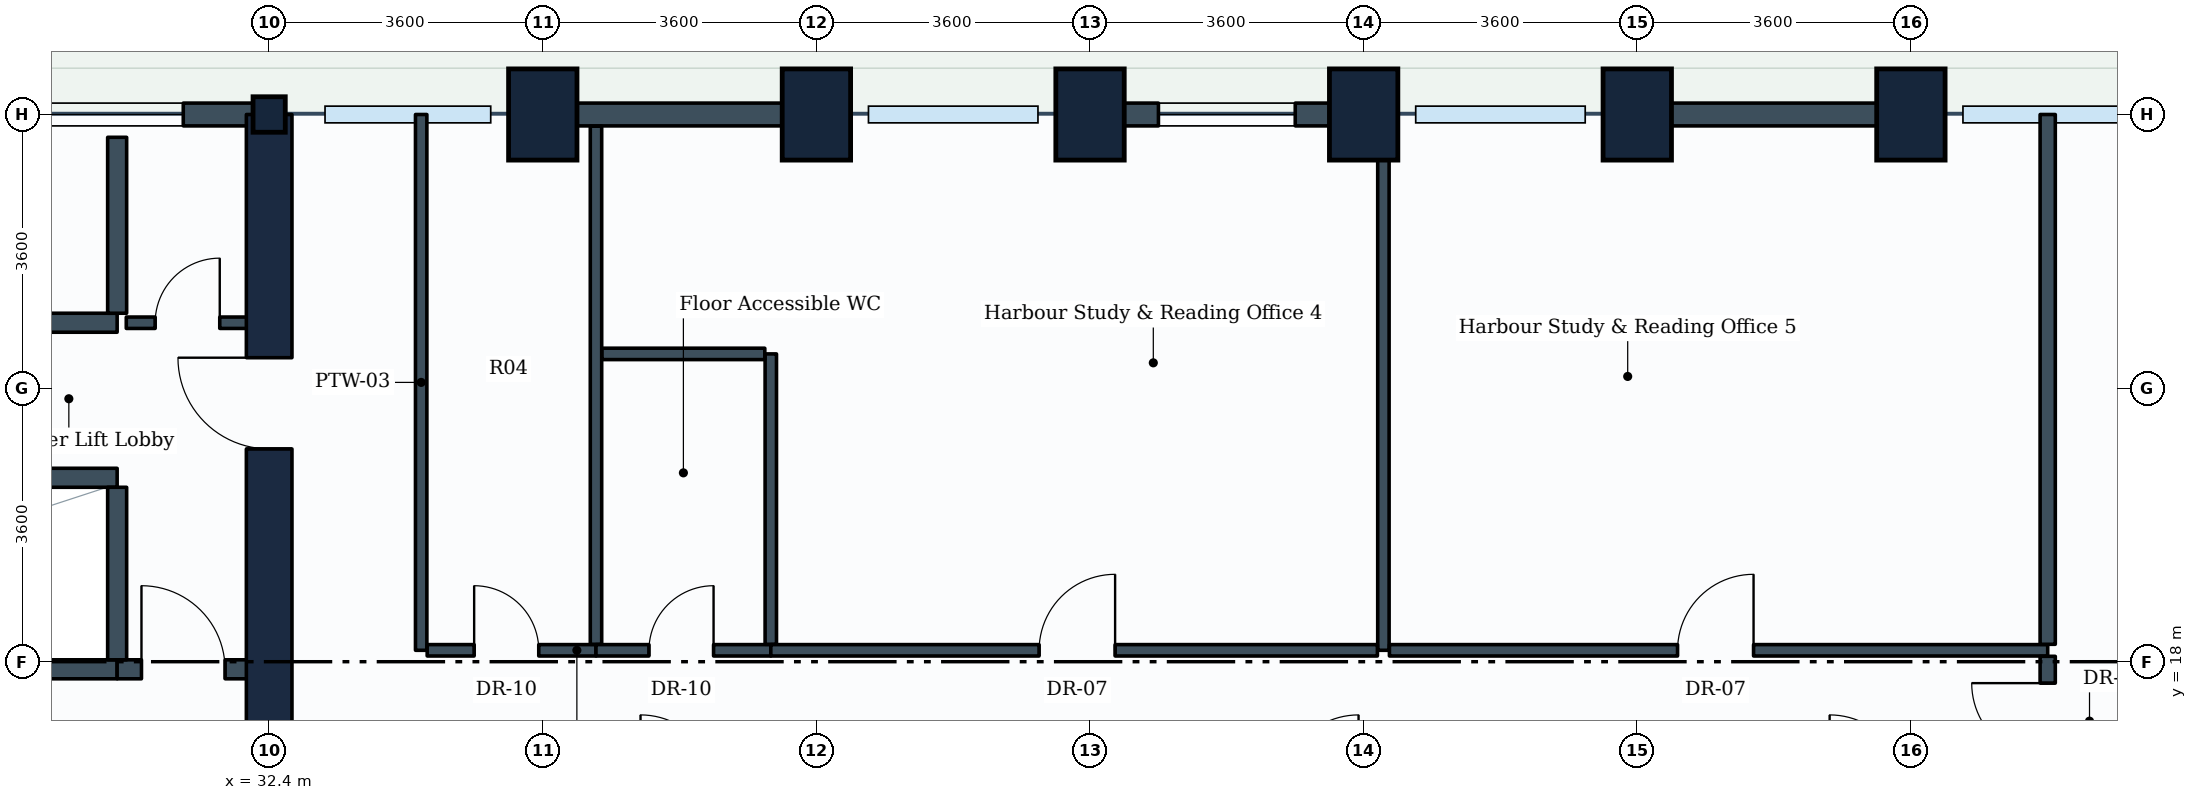
"""IFC4 building model, lengths in metres.
Left out: names, types, materials, properties, quantities, classifications, styles, units other than length and angle.
Written with IfcOpenShell. Run it as: python <this file> out.ifc"""

import sys

from ifc_helpers import new_model, si_unit, direction, frame, frame_2d, origin, origin_2d, place, context, subcontext, project, spatial, rectangle, i_section, extrude, element, fill, save


model = new_model("IFC4")
c1 = context("Model", 3, precision=1e-05, world=origin(), true_north=direction((0.0, 1.0)))
c2 = subcontext(c1, "Body", "Model", "MODEL_VIEW")
j1 = project(units=[si_unit("LENGTHUNIT", "METRE"), si_unit("PLANEANGLEUNIT", "RADIAN")], contexts=[c1])
p1 = place(None, origin())
s1 = spatial("IfcSite", under=j1, at=p1, CompositionType="ELEMENT")
p2 = place(p1, origin())
s2 = spatial("IfcBuilding", under=s1, at=p2, CompositionType="ELEMENT")
p3 = place(p2, frame((0.0, 0.0, 24.0)))
s3 = spatial("IfcBuildingStorey", under=s2, at=p3, CompositionType="ELEMENT", Elevation=24.0)
p4 = place(p3, frame((32.4, 25.2, 0.0), z_axis=(0.0, 0.0, 1.0), x_axis=(1.0, 0.0, 0.0)))
e1 = element("IfcColumn", 1, at=p4, inside=s3, PredefinedType="COLUMN", context=c2, shape_type="SweptSolid", body=[
    extrude(i_section(OverallWidth=0.424, OverallDepth=0.467, WebThickness=0.033, FlangeThickness=0.053, FilletRadius=0.015, at=origin_2d()), origin(), (0.0, 0.0, 1.0), 3.9),
])
for number, where, z_axis, x_axis in (
    (2, (36.0, 25.2, 0.0), (0.0, 0.0, 1.0), (1.0, 0.0, 0.0)),
    (3, (39.6, 25.2, 0.0), (0.0, 0.0, 1.0), (1.0, 0.0, 0.0)),
    (4, (43.2, 25.2, 0.0), (0.0, 0.0, 1.0), (1.0, 0.0, 0.0)),
    (5, (46.8, 25.2, 0.0), (0.0, 0.0, 1.0), (1.0, 0.0, 0.0)),
    (6, (50.4, 25.2, 0.0), (0.0, 0.0, 1.0), (1.0, 0.0, 0.0)),
    (7, (54.0, 25.2, 0.0), (0.0, 0.0, 1.0), (1.0, 0.0, 0.0)),
):
    element("IfcColumn", number, at=place(p3, frame(where, z_axis=z_axis, x_axis=x_axis)), inside=s3, PredefinedType="COLUMN", context=c2, shape_type="SweptSolid", body=[
        extrude(rectangle(XDim=0.9, YDim=1.2, at=origin_2d()), origin(), (0.0, 0.0, 1.0), 3.9),
    ])
p5 = place(p3, frame((50.4, 25.2, 0.0), z_axis=(0.0, 0.0, 1.0), x_axis=(1.0, 0.0, 0.0)))
e8 = element("IfcWall", 8, at=p5, inside=s3, PredefinedType="STANDARD", context=c2, shape_type="SweptSolid", body=[
    extrude(rectangle(XDim=3.6, YDim=0.3, at=frame_2d((1.8, 0.0))), origin(), (0.0, 0.0, 1.0), 2.93),
])
p6 = place(p3, frame((43.2, 25.2, 0.0), z_axis=(0.0, 0.0, 1.0), x_axis=(1.0, 0.0, 0.0)))
e9 = element("IfcWall", 9, at=p6, inside=s3, PredefinedType="STANDARD", context=c2, shape_type="SweptSolid", body=[
    extrude(rectangle(XDim=3.6, YDim=0.3, at=frame_2d((1.8, 0.0))), origin(), (0.0, 0.0, 1.0), 2.93),
])
p7 = place(p6, frame((0.9, 0.0, 0.85)))
e10 = element("IfcOpeningElement", 10, at=p7, cuts=e9, PredefinedType="OPENING", context=c2, shape_type="SweptSolid", body=[
    extrude(rectangle(XDim=1.8, YDim=1.35, at=frame_2d((0.9, 0.675))), frame((0.0, 0.16, 0.0), z_axis=(0.0, -1.0, 0.0), x_axis=(1.0, 0.0, 0.0)), (0.0, 0.0, 1.0), 0.32),
])
p8 = place(p3, frame((36.0, 25.2, 0.0), z_axis=(0.0, 0.0, 1.0), x_axis=(1.0, 0.0, 0.0)))
e11 = element("IfcWall", 11, at=p8, inside=s3, PredefinedType="STANDARD", context=c2, shape_type="SweptSolid", body=[
    extrude(rectangle(XDim=3.6, YDim=0.3, at=frame_2d((1.8, 0.0))), origin(), (0.0, 0.0, 1.0), 2.93),
])
p9 = place(p3, frame((28.8, 25.2, 0.0), z_axis=(0.0, 0.0, 1.0), x_axis=(1.0, 0.0, 0.0)))
e12 = element("IfcWall", 12, at=p9, inside=s3, PredefinedType="STANDARD", context=c2, shape_type="SweptSolid", body=[
    extrude(rectangle(XDim=3.6, YDim=0.3, at=frame_2d((1.8, 0.0))), origin(), (0.0, 0.0, 1.0), 3.635),
])
p10 = place(p9, frame((0.67, 0.0, 0.85)))
e13 = element("IfcOpeningElement", 13, at=p10, cuts=e12, PredefinedType="OPENING", context=c2, shape_type="SweptSolid", body=[
    extrude(rectangle(XDim=1.8, YDim=1.35, at=frame_2d((0.9, 0.675))), frame((0.0, 0.16, 0.0), z_axis=(0.0, -1.0, 0.0), x_axis=(1.0, 0.0, 0.0)), (0.0, 0.0, 1.0), 0.32),
])
p11 = place(p3, frame((32.4, 10.8, 0.0), z_axis=(0.0, 0.0, 1.0), x_axis=(0.0, 1.0, 0.0)))
e14 = element("IfcWall", 14, at=p11, inside=s3, PredefinedType="SHEAR", context=c2, shape_type="SweptSolid", body=[
    extrude(rectangle(XDim=14.4, YDim=0.6, at=frame_2d((7.2, 0.0))), origin(), (0.0, 0.0, 1.0), 3.65),
])
p12 = place(p11, frame((4.35, 0.0, 0.0)))
e15 = element("IfcOpeningElement", 15, at=p12, cuts=e14, PredefinedType="OPENING", context=c2, shape_type="SweptSolid", body=[
    extrude(rectangle(XDim=1.2, YDim=2.1, at=frame_2d((0.6, 1.05))), frame((0.0, 0.31, 0.0), z_axis=(0.0, -1.0, 0.0), x_axis=(1.0, 0.0, 0.0)), (0.0, 0.0, 1.0), 0.62),
])
p13 = place(p11, frame((10.0, 0.0, 0.0)))
e16 = element("IfcOpeningElement", 16, at=p13, cuts=e14, PredefinedType="OPENING", context=c2, shape_type="SweptSolid", body=[
    extrude(rectangle(XDim=1.2, YDim=2.1, at=frame_2d((0.6, 1.05))), frame((0.0, 0.31, 0.0), z_axis=(0.0, -1.0, 0.0), x_axis=(1.0, 0.0, 0.0)), (0.0, 0.0, 1.0), 0.62),
])
p14 = place(p3, frame((21.88, 17.9, 0.0), z_axis=(0.0, 0.0, 1.0), x_axis=(1.0, 0.0, 0.0)))
e17 = element("IfcWall", 17, at=p14, inside=s3, PredefinedType="PARTITIONING", context=c2, shape_type="SweptSolid", body=[
    extrude(rectangle(XDim=8.52, YDim=0.25, at=frame_2d((4.26, 0.0))), origin(), (0.0, 0.0, 1.0), 3.635),
])
p15 = place(p3, frame((30.4, 17.9, 0.0), z_axis=(0.0, 0.0, 1.0), x_axis=(1.0, 0.0, 0.0)))
e18 = element("IfcWall", 18, at=p15, inside=s3, PredefinedType="PARTITIONING", context=c2, shape_type="SweptSolid", body=[
    extrude(rectangle(XDim=1.75, YDim=0.25, at=frame_2d((0.875, 0.0))), origin(), (0.0, 0.0, 1.0), 3.635),
])
p16 = place(p15, frame((0.32, 0.0, 0.0)))
e19 = element("IfcOpeningElement", 19, at=p16, cuts=e18, PredefinedType="OPENING", context=c2, shape_type="SweptSolid", body=[
    extrude(rectangle(XDim=1.1, YDim=2.1, at=frame_2d((0.55, 1.05))), frame((0.0, 0.135, 0.0), z_axis=(0.0, -1.0, 0.0), x_axis=(1.0, 0.0, 0.0)), (0.0, 0.0, 1.0), 0.27),
])
p17 = place(p3, frame((23.18, 20.42, 0.0), z_axis=(0.0, 0.0, 1.0), x_axis=(1.0, 0.0, 0.0)))
e20 = element("IfcWall", 20, at=p17, inside=s3, PredefinedType="PARTITIONING", context=c2, shape_type="SweptSolid", body=[
    extrude(rectangle(XDim=7.22, YDim=0.25, at=frame_2d((3.61, 0.0))), origin(), (0.0, 0.0, 1.0), 3.635),
])
p18 = place(p3, frame((30.4, 18.025, 0.0), z_axis=(0.0, 0.0, 1.0), x_axis=(0.0, 1.0, 0.0)))
e21 = element("IfcWall", 21, at=p18, inside=s3, PredefinedType="PARTITIONING", context=c2, shape_type="SweptSolid", body=[
    extrude(rectangle(XDim=2.27, YDim=0.25, at=frame_2d((1.135, 0.0))), origin(), (0.0, 0.0, 1.0), 3.635),
])
p19 = place(p3, frame((23.18, 22.46, 0.0), z_axis=(0.0, 0.0, 1.0), x_axis=(1.0, 0.0, 0.0)))
e22 = element("IfcWall", 22, at=p19, inside=s3, PredefinedType="PARTITIONING", context=c2, shape_type="SweptSolid", body=[
    extrude(rectangle(XDim=7.22, YDim=0.25, at=frame_2d((3.61, 0.0))), origin(), (0.0, 0.0, 1.0), 3.635),
])
p20 = place(p3, frame((30.4, 22.585, 0.0), z_axis=(0.0, 0.0, 1.0), x_axis=(0.0, 1.0, 0.0)))
e23 = element("IfcWall", 23, at=p20, inside=s3, PredefinedType="PARTITIONING", context=c2, shape_type="SweptSolid", body=[
    extrude(rectangle(XDim=2.315, YDim=0.25, at=frame_2d((1.157, 0.0))), origin(), (0.0, 0.0, 1.0), 3.635),
])
p21 = place(p3, frame((30.52, 22.46, 0.0), z_axis=(0.0, 0.0, 1.0), x_axis=(1.0, 0.0, 0.0)))
e24 = element("IfcWall", 24, at=p21, inside=s3, PredefinedType="PARTITIONING", context=c2, shape_type="SweptSolid", body=[
    extrude(rectangle(XDim=1.63, YDim=0.15, at=frame_2d((0.815, 0.0))), origin(), (0.0, 0.0, 1.0), 3.635),
])
p22 = place(p21, frame((0.38, 0.0, 0.0)))
e25 = element("IfcOpeningElement", 25, at=p22, cuts=e24, PredefinedType="OPENING", context=c2, shape_type="SweptSolid", body=[
    extrude(rectangle(XDim=0.85, YDim=2.1, at=frame_2d((0.425, 1.05))), frame((0.0, 0.085, 0.0), z_axis=(0.0, -1.0, 0.0), x_axis=(1.0, 0.0, 0.0)), (0.0, 0.0, 1.0), 0.17),
])
p23 = place(p3, frame((34.4, 18.15, 0.0), z_axis=(0.0, 0.0, 1.0), x_axis=(0.0, 1.0, 0.0)))
e26 = element("IfcWall", 26, at=p23, inside=s3, PredefinedType="PARTITIONING", context=c2, shape_type="SweptSolid", body=[
    extrude(rectangle(XDim=7.05, YDim=0.15, at=frame_2d((3.525, 0.0))), origin(), (0.0, 0.0, 1.0), 2.93),
])
p24 = place(p3, frame((34.479, 18.15, 0.0), z_axis=(0.0, 0.0, 1.0), x_axis=(1.0, 0.0, 0.0)))
e27 = element("IfcWall", 27, at=p24, inside=s3, PredefinedType="PARTITIONING", context=c2, shape_type="SweptSolid", body=[
    extrude(rectangle(XDim=2.221, YDim=0.15, at=frame_2d((1.11, 0.0))), origin(), (0.0, 0.0, 1.0), 3.08),
])
p25 = place(p24, frame((0.618, 0.0, 0.0)))
e28 = element("IfcOpeningElement", 28, at=p25, cuts=e27, PredefinedType="OPENING", context=c2, shape_type="SweptSolid", body=[
    extrude(rectangle(XDim=0.85, YDim=2.1, at=frame_2d((0.425, 1.05))), frame((0.0, 0.085, 0.0), z_axis=(0.0, -1.0, 0.0), x_axis=(1.0, 0.0, 0.0)), (0.0, 0.0, 1.0), 0.17),
])
p26 = place(p3, frame((36.7, 18.229, 0.0), z_axis=(0.0, 0.0, 1.0), x_axis=(0.0, 1.0, 0.0)))
e29 = element("IfcWall", 29, at=p26, inside=s3, PredefinedType="PARTITIONING", context=c2, shape_type="SweptSolid", body=[
    extrude(rectangle(XDim=6.817, YDim=0.15, at=frame_2d((3.408, 0.0))), origin(), (0.0, 0.0, 1.0), 2.93),
])
p27 = place(p3, frame((36.7, 18.15, 0.0), z_axis=(0.0, 0.0, 1.0), x_axis=(1.0, 0.0, 0.0)))
e30 = element("IfcWall", 30, at=p27, inside=s3, PredefinedType="PARTITIONING", context=c2, shape_type="SweptSolid", body=[
    extrude(rectangle(XDim=2.3, YDim=0.15, at=frame_2d((1.15, 0.0))), origin(), (0.0, 0.0, 1.0), 3.08),
])
p28 = place(p27, frame((0.697, 0.0, 0.0)))
e31 = element("IfcOpeningElement", 31, at=p28, cuts=e30, PredefinedType="OPENING", context=c2, shape_type="SweptSolid", body=[
    extrude(rectangle(XDim=0.85, YDim=2.1, at=frame_2d((0.425, 1.05))), frame((0.0, 0.085, 0.0), z_axis=(0.0, -1.0, 0.0), x_axis=(1.0, 0.0, 0.0)), (0.0, 0.0, 1.0), 0.17),
])
p29 = place(p3, frame((39.0, 18.229, 0.0), z_axis=(0.0, 0.0, 1.0), x_axis=(0.0, 1.0, 0.0)))
e32 = element("IfcWall", 32, at=p29, inside=s3, PredefinedType="PARTITIONING", context=c2, shape_type="SweptSolid", body=[
    extrude(rectangle(XDim=3.821, YDim=0.15, at=frame_2d((1.911, 0.0))), origin(), (0.0, 0.0, 1.0), 3.03),
])
p30 = place(p3, frame((36.779, 22.05, 0.0), z_axis=(0.0, 0.0, 1.0), x_axis=(1.0, 0.0, 0.0)))
e33 = element("IfcWall", 33, at=p30, inside=s3, PredefinedType="PARTITIONING", context=c2, shape_type="SweptSolid", body=[
    extrude(rectangle(XDim=2.142, YDim=0.15, at=frame_2d((1.071, 0.0))), origin(), (0.0, 0.0, 1.0), 3.635),
])
p31 = place(p3, frame((47.06, 18.15, 0.0), z_axis=(0.0, 0.0, 1.0), x_axis=(0.0, 1.0, 0.0)))
e34 = element("IfcWall", 34, at=p31, inside=s3, PredefinedType="PARTITIONING", context=c2, shape_type="SweptSolid", body=[
    extrude(rectangle(XDim=7.05, YDim=0.15, at=frame_2d((3.525, 0.0))), origin(), (0.0, 0.0, 1.0), 2.93),
])
p32 = place(p3, frame((39.0, 18.15, 0.0), z_axis=(0.0, 0.0, 1.0), x_axis=(1.0, 0.0, 0.0)))
e35 = element("IfcWall", 35, at=p32, inside=s3, PredefinedType="PARTITIONING", context=c2, shape_type="SweptSolid", body=[
    extrude(rectangle(XDim=7.981, YDim=0.15, at=frame_2d((3.99, 0.0))), origin(), (0.0, 0.0, 1.0), 3.03),
])
p33 = place(p32, frame((3.53, 0.0, 0.0)))
e36 = element("IfcOpeningElement", 36, at=p33, cuts=e35, PredefinedType="OPENING", context=c2, shape_type="SweptSolid", body=[
    extrude(rectangle(XDim=1.0, YDim=2.1, at=frame_2d((0.5, 1.05))), frame((0.0, 0.085, 0.0), z_axis=(0.0, -1.0, 0.0), x_axis=(1.0, 0.0, 0.0)), (0.0, 0.0, 1.0), 0.17),
])
p34 = place(p3, frame((47.139, 18.15, 0.0), z_axis=(0.0, 0.0, 1.0), x_axis=(1.0, 0.0, 0.0)))
e37 = element("IfcWall", 37, at=p34, inside=s3, PredefinedType="PARTITIONING", context=c2, shape_type="SweptSolid", body=[
    extrude(rectangle(XDim=8.661, YDim=0.15, at=frame_2d((4.331, 0.0))), origin(), (0.0, 0.0, 1.0), 3.04),
])
p35 = place(p34, frame((3.791, 0.0, 0.0)))
e38 = element("IfcOpeningElement", 38, at=p35, cuts=e37, PredefinedType="OPENING", context=c2, shape_type="SweptSolid", body=[
    extrude(rectangle(XDim=1.0, YDim=2.1, at=frame_2d((0.5, 1.05))), frame((0.0, 0.085, 0.0), z_axis=(0.0, -1.0, 0.0), x_axis=(1.0, 0.0, 0.0)), (0.0, 0.0, 1.0), 0.17),
])
p36 = place(p3, frame((55.8, 18.229, 0.0), z_axis=(0.0, 0.0, 1.0), x_axis=(0.0, 1.0, 0.0)))
e39 = element("IfcWall", 39, at=p36, inside=s3, PredefinedType="PARTITIONING", context=c2, shape_type="SweptSolid", body=[
    extrude(rectangle(XDim=6.971, YDim=0.2, at=frame_2d((3.485, 0.0))), origin(), (0.0, 0.0, 1.0), 2.93),
])
p37 = place(p3, frame((55.8, 16.379, 0.0), z_axis=(0.0, 0.0, 1.0), x_axis=(0.0, 1.0, 0.0)))
e40 = element("IfcWall", 40, at=p37, inside=s3, PredefinedType="PARTITIONING", context=c2, shape_type="SweptSolid", body=[
    extrude(rectangle(XDim=1.692, YDim=0.2, at=frame_2d((0.846, 0.0))), origin(), (0.0, 0.0, 1.0), 3.635),
])
p38 = place(p37, frame((0.339, 0.0, 0.0)))
e41 = element("IfcOpeningElement", 41, at=p38, cuts=e40, PredefinedType="OPENING", context=c2, shape_type="SweptSolid", body=[
    extrude(rectangle(XDim=1.0, YDim=2.1, at=frame_2d((0.5, 1.05))), frame((0.0, 0.11, 0.0), z_axis=(0.0, -1.0, 0.0), x_axis=(1.0, 0.0, 0.0)), (0.0, 0.0, 1.0), 0.22),
])
p39 = place(p7, origin())
e42 = element("IfcWindow", 42, at=p39, inside=s3, PartitioningType="SINGLE_PANEL", PredefinedType="WINDOW", context=c2, shape_type="SweptSolid", body=[
    extrude(rectangle(XDim=1.8, YDim=1.35, at=frame_2d((0.9, 0.675))), frame((0.0, 0.03, 0.0), z_axis=(0.0, -1.0, 0.0), x_axis=(1.0, 0.0, 0.0)), (0.0, 0.0, 1.0), 0.06),
])
fill(e10, e42)
p40 = place(p10, origin())
e43 = element("IfcWindow", 43, at=p40, inside=s3, PartitioningType="SINGLE_PANEL", PredefinedType="WINDOW", context=c2, shape_type="SweptSolid", body=[
    extrude(rectangle(XDim=1.8, YDim=1.35, at=frame_2d((0.9, 0.675))), frame((0.0, 0.03, 0.0), z_axis=(0.0, -1.0, 0.0), x_axis=(1.0, 0.0, 0.0)), (0.0, 0.0, 1.0), 0.06),
])
fill(e13, e43)
p41 = place(p16, origin())
e44 = element("IfcDoor", 44, at=p41, inside=s3, OperationType="SINGLE_SWING_LEFT", PredefinedType="DOOR", context=c2, shape_type="SweptSolid", body=[
    extrude(rectangle(XDim=1.1, YDim=2.1, at=frame_2d((0.55, 1.05))), frame((0.0, 0.025, 0.0), z_axis=(0.0, -1.0, 0.0), x_axis=(1.0, 0.0, 0.0)), (0.0, 0.0, 1.0), 0.05),
])
fill(e19, e44)
p42 = place(p13, origin())
e45 = element("IfcDoor", 45, at=p42, inside=s3, OperationType="SINGLE_SWING_RIGHT", PredefinedType="DOOR", context=c2, shape_type="SweptSolid", body=[
    extrude(rectangle(XDim=1.2, YDim=2.1, at=frame_2d((0.6, 1.05))), frame((0.0, 0.025, 0.0), z_axis=(0.0, -1.0, 0.0), x_axis=(1.0, 0.0, 0.0)), (0.0, 0.0, 1.0), 0.05),
])
fill(e16, e45)
p43 = place(p22, origin())
e46 = element("IfcDoor", 46, at=p43, inside=s3, OperationType="SINGLE_SWING_RIGHT", PredefinedType="DOOR", context=c2, shape_type="SweptSolid", body=[
    extrude(rectangle(XDim=0.85, YDim=2.1, at=frame_2d((0.425, 1.05))), frame((0.0, 0.025, 0.0), z_axis=(0.0, -1.0, 0.0), x_axis=(1.0, 0.0, 0.0)), (0.0, 0.0, 1.0), 0.05),
])
fill(e25, e46)
p44 = place(p25, origin())
e47 = element("IfcDoor", 47, at=p44, inside=s3, OperationType="SINGLE_SWING_LEFT", PredefinedType="DOOR", context=c2, shape_type="SweptSolid", body=[
    extrude(rectangle(XDim=0.85, YDim=2.1, at=frame_2d((0.425, 1.05))), frame((0.0, 0.025, 0.0), z_axis=(0.0, -1.0, 0.0), x_axis=(1.0, 0.0, 0.0)), (0.0, 0.0, 1.0), 0.05),
])
fill(e28, e47)
p45 = place(p28, origin())
e48 = element("IfcDoor", 48, at=p45, inside=s3, OperationType="SINGLE_SWING_RIGHT", PredefinedType="DOOR", context=c2, shape_type="SweptSolid", body=[
    extrude(rectangle(XDim=0.85, YDim=2.1, at=frame_2d((0.425, 1.05))), frame((0.0, 0.025, 0.0), z_axis=(0.0, -1.0, 0.0), x_axis=(1.0, 0.0, 0.0)), (0.0, 0.0, 1.0), 0.05),
])
fill(e31, e48)
p46 = place(p33, origin())
e49 = element("IfcDoor", 49, at=p46, inside=s3, OperationType="SINGLE_SWING_RIGHT", PredefinedType="DOOR", context=c2, shape_type="SweptSolid", body=[
    extrude(rectangle(XDim=1.0, YDim=2.1, at=frame_2d((0.5, 1.05))), frame((0.0, 0.025, 0.0), z_axis=(0.0, -1.0, 0.0), x_axis=(1.0, 0.0, 0.0)), (0.0, 0.0, 1.0), 0.05),
])
fill(e36, e49)
p47 = place(p35, origin())
e50 = element("IfcDoor", 50, at=p47, inside=s3, OperationType="SINGLE_SWING_RIGHT", PredefinedType="DOOR", context=c2, shape_type="SweptSolid", body=[
    extrude(rectangle(XDim=1.0, YDim=2.1, at=frame_2d((0.5, 1.05))), frame((0.0, 0.025, 0.0), z_axis=(0.0, -1.0, 0.0), x_axis=(1.0, 0.0, 0.0)), (0.0, 0.0, 1.0), 0.05),
])
fill(e38, e50)
p48 = place(p38, origin())
e51 = element("IfcDoor", 51, at=p48, inside=s3, OperationType="SINGLE_SWING_RIGHT", PredefinedType="DOOR", context=c2, shape_type="SweptSolid", body=[
    extrude(rectangle(XDim=1.0, YDim=2.1, at=frame_2d((0.5, 1.05))), frame((0.0, 0.025, 0.0), z_axis=(0.0, -1.0, 0.0), x_axis=(1.0, 0.0, 0.0)), (0.0, 0.0, 1.0), 0.05),
])
fill(e41, e51)
save(model, sys.argv[1])
